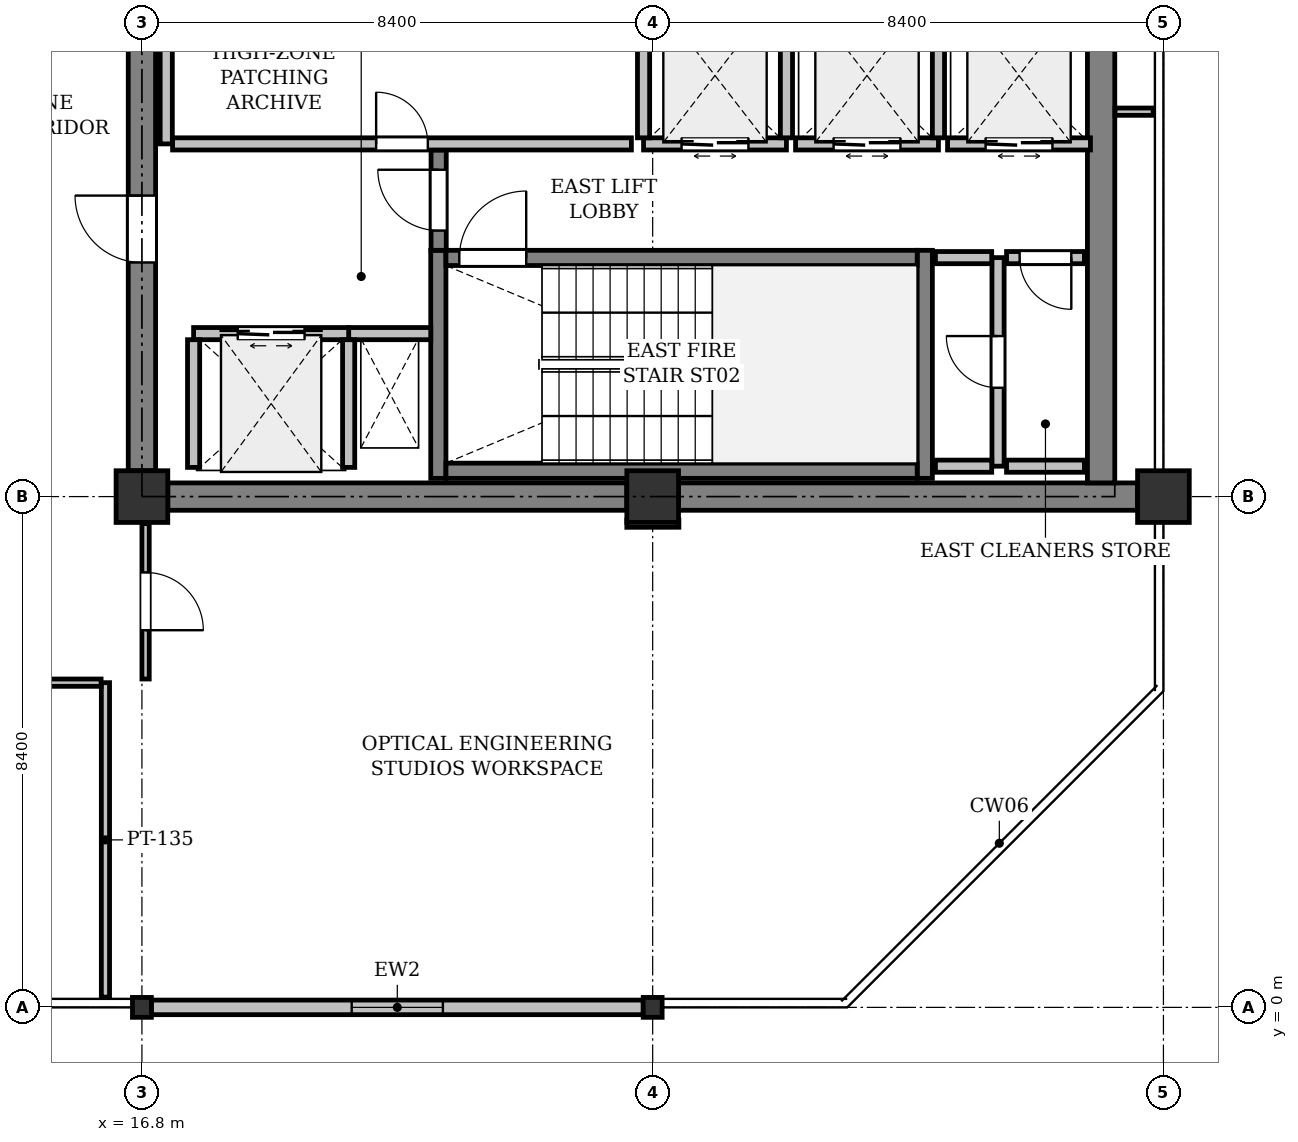
"""IFC4 building model, lengths in metres.
Left out: names, types, materials, properties, quantities, classifications, styles, units other than length and angle.
Written with IfcOpenShell. Run it as: python <this file> out.ifc"""

import sys

from ifc_helpers import new_model, si_unit, direction, frame, frame_2d, origin, origin_2d, place, context, subcontext, project, spatial, rectangle, i_section, extrude, element, fill, save


model = new_model("IFC4")
c1 = context("Model", 3, precision=1e-05, world=origin(), true_north=direction((0.0, 1.0)))
c2 = subcontext(c1, "Body", "Model", "MODEL_VIEW")
j1 = project(units=[si_unit("LENGTHUNIT", "METRE"), si_unit("PLANEANGLEUNIT", "RADIAN")], contexts=[c1])
p1 = place(None, origin())
s1 = spatial("IfcSite", under=j1, at=p1, CompositionType="ELEMENT")
p2 = place(p1, origin())
s2 = spatial("IfcBuilding", under=s1, at=p2, CompositionType="ELEMENT")
p3 = place(p2, frame((0.0, 0.0, 302.2)))
s3 = spatial("IfcBuildingStorey", under=s2, at=p3, CompositionType="ELEMENT", Elevation=302.2)
p4 = place(p3, frame((16.8, 0.0, 0.0), z_axis=(0.0, 0.0, 1.0), x_axis=(1.0, 0.0, 0.0)))
e1 = element("IfcColumn", 1, at=p4, inside=s3, PredefinedType="COLUMN", context=c2, shape_type="SweptSolid", body=[
    extrude(i_section(OverallWidth=0.311, OverallDepth=0.327, WebThickness=0.016, FlangeThickness=0.025, FilletRadius=0.017, at=origin_2d()), origin(), (0.0, 0.0, 1.0), 4.0),
])
p5 = place(p3, frame((16.8, 8.4, 0.0), z_axis=(0.0, 0.0, 1.0), x_axis=(1.0, 0.0, 0.0)))
e2 = element("IfcColumn", 2, at=p5, inside=s3, PredefinedType="COLUMN", context=c2, shape_type="SweptSolid", body=[
    extrude(rectangle(XDim=0.85, YDim=0.85, at=origin_2d()), origin(), (0.0, 0.0, 1.0), 4.0),
])
p6 = place(p3, frame((25.2, 0.0, 0.0), z_axis=(0.0, 0.0, 1.0), x_axis=(1.0, 0.0, 0.0)))
e3 = element("IfcColumn", 3, at=p6, inside=s3, PredefinedType="COLUMN", context=c2, shape_type="SweptSolid", body=[
    extrude(i_section(OverallWidth=0.311, OverallDepth=0.327, WebThickness=0.016, FlangeThickness=0.025, FilletRadius=0.017, at=origin_2d()), origin(), (0.0, 0.0, 1.0), 4.0),
])
for number, where, z_axis, x_axis in (
    (4, (25.2, 8.4, 0.0), (0.0, 0.0, 1.0), (1.0, 0.0, 0.0)),
    (5, (33.6, 8.4, 0.0), (0.0, 0.0, 1.0), (1.0, 0.0, 0.0)),
):
    element("IfcColumn", number, at=place(p3, frame(where, z_axis=z_axis, x_axis=x_axis)), inside=s3, PredefinedType="COLUMN", context=c2, shape_type="SweptSolid", body=[
        extrude(rectangle(XDim=0.85, YDim=0.85, at=origin_2d()), origin(), (0.0, 0.0, 1.0), 4.0),
    ])
p7 = place(p3, frame((25.044, 0.0, 0.0), z_axis=(0.0, 0.0, 1.0), x_axis=(-1.0, 0.0, 0.0)))
e6 = element("IfcWall", 6, at=p7, inside=s3, PredefinedType="STANDARD", context=c2, shape_type="SweptSolid", body=[
    extrude(rectangle(XDim=8.089, YDim=0.24, at=frame_2d((4.044, 0.0))), origin(), (0.0, 0.0, 1.0), 3.475),
])
p8 = place(p7, frame((3.294, 0.0, 0.9)))
e7 = element("IfcOpeningElement", 7, at=p8, cuts=e6, PredefinedType="OPENING", context=c2, shape_type="SweptSolid", body=[
    extrude(rectangle(XDim=1.5, YDim=1.6, at=frame_2d((0.75, 0.8))), frame((0.0, 0.13, 0.0), z_axis=(0.0, -1.0, 0.0), x_axis=(1.0, 0.0, 0.0)), (0.0, 0.0, 1.0), 0.26),
])
p9 = place(p3, frame((17.225, 8.4, 0.0), z_axis=(0.0, 0.0, 1.0), x_axis=(1.0, 0.0, 0.0)))
e8 = element("IfcWall", 8, at=p9, inside=s3, PredefinedType="SHEAR", context=c2, shape_type="SweptSolid", body=[
    extrude(rectangle(XDim=7.55, YDim=0.45, at=frame_2d((3.775, 0.0))), origin(), (0.0, 0.0, 1.0), 3.725),
])
p10 = place(p3, frame((25.625, 8.4, 0.0), z_axis=(0.0, 0.0, 1.0), x_axis=(1.0, 0.0, 0.0)))
e9 = element("IfcWall", 9, at=p10, inside=s3, PredefinedType="SHEAR", context=c2, shape_type="SweptSolid", body=[
    extrude(rectangle(XDim=7.55, YDim=0.45, at=frame_2d((3.775, 0.0))), origin(), (0.0, 0.0, 1.0), 3.725),
])
p11 = place(p3, frame((32.575, 8.625, 0.0), z_axis=(0.0, 0.0, 1.0), x_axis=(0.0, 1.0, 0.0)))
e10 = element("IfcWall", 10, at=p11, inside=s3, PredefinedType="SHEAR", context=c2, shape_type="SweptSolid", body=[
    extrude(rectangle(XDim=7.95, YDim=0.45, at=frame_2d((3.975, 0.0))), origin(), (0.0, 0.0, 1.0), 3.725),
])
p12 = place(p3, frame((16.8, 8.825, 0.0), z_axis=(0.0, 0.0, 1.0), x_axis=(0.0, 1.0, 0.0)))
e11 = element("IfcWall", 11, at=p12, inside=s3, PredefinedType="SHEAR", context=c2, shape_type="SweptSolid", body=[
    extrude(rectangle(XDim=7.55, YDim=0.45, at=frame_2d((3.775, 0.0))), origin(), (0.0, 0.0, 1.0), 3.725),
])
p13 = place(p12, frame((3.425, 0.0, 0.0)))
e12 = element("IfcOpeningElement", 12, at=p13, cuts=e11, PredefinedType="OPENING", context=c2, shape_type="SweptSolid", body=[
    extrude(rectangle(XDim=1.1, YDim=2.15, at=frame_2d((0.55, 1.075))), frame((0.0, 0.235, 0.0), z_axis=(0.0, -1.0, 0.0), x_axis=(1.0, 0.0, 0.0)), (0.0, 0.0, 1.0), 0.47),
])
for number, where, z_axis, x_axis in (
    (13, (21.675, 8.7, 0.0), (0.0, 0.0, 1.0), (0.0, 1.0, 0.0)),
    (14, (29.675, 8.7, 0.0), (0.0, 0.0, 1.0), (0.0, 1.0, 0.0)),
):
    element("IfcWall", number, at=place(p3, frame(where, z_axis=z_axis, x_axis=x_axis)), inside=s3, PredefinedType="SHEAR", context=c2, shape_type="SweptSolid", body=[
        extrude(rectangle(XDim=3.75, YDim=0.25, at=frame_2d((1.875, 0.0))), origin(), (0.0, 0.0, 1.0), 3.725),
    ])
p14 = place(p3, frame((21.8, 8.825, 0.0), z_axis=(0.0, 0.0, 1.0), x_axis=(1.0, 0.0, 0.0)))
e15 = element("IfcWall", 15, at=p14, inside=s3, PredefinedType="SHEAR", context=c2, shape_type="SweptSolid", body=[
    extrude(rectangle(XDim=7.75, YDim=0.25, at=frame_2d((3.875, 0.0))), origin(), (0.0, 0.0, 1.0), 3.725),
])
p15 = place(p3, frame((21.8, 12.325, 0.0), z_axis=(0.0, 0.0, 1.0), x_axis=(1.0, 0.0, 0.0)))
e16 = element("IfcWall", 16, at=p15, inside=s3, PredefinedType="SHEAR", context=c2, shape_type="SweptSolid", body=[
    extrude(rectangle(XDim=7.75, YDim=0.25, at=frame_2d((3.875, 0.0))), origin(), (0.0, 0.0, 1.0), 3.725),
])
p16 = place(p15, frame((0.22, 0.0, 0.0)))
e17 = element("IfcOpeningElement", 17, at=p16, cuts=e16, PredefinedType="OPENING", context=c2, shape_type="SweptSolid", body=[
    extrude(rectangle(XDim=1.1, YDim=2.15, at=frame_2d((0.55, 1.075))), frame((0.0, 0.135, 0.0), z_axis=(0.0, -1.0, 0.0), x_axis=(1.0, 0.0, 0.0)), (0.0, 0.0, 1.0), 0.27),
])
p17 = place(p3, frame((20.2, 11.08, 0.0), z_axis=(0.0, 0.0, 1.0), x_axis=(1.0, 0.0, 0.0)))
e18 = element("IfcWall", 18, at=p17, inside=s3, PredefinedType="PARTITIONING", context=c2, shape_type="SweptSolid", body=[
    extrude(rectangle(XDim=1.35, YDim=0.2, at=frame_2d((0.675, 0.0))), origin(), (0.0, 0.0, 1.0), 3.725),
])
p18 = place(p3, frame((21.68, 12.45, 0.0), z_axis=(0.0, 0.0, 1.0), x_axis=(0.0, 1.0, 0.0)))
e19 = element("IfcWall", 19, at=p18, inside=s3, PredefinedType="SHEAR", context=c2, shape_type="SweptSolid", body=[
    extrude(rectangle(XDim=1.65, YDim=0.25, at=frame_2d((0.825, 0.0))), origin(), (0.0, 0.0, 1.0), 3.725),
])
p19 = place(p18, frame((0.325, 0.0, 0.0)))
e20 = element("IfcOpeningElement", 20, at=p19, cuts=e19, PredefinedType="OPENING", context=c2, shape_type="SweptSolid", body=[
    extrude(rectangle(XDim=1.0, YDim=2.15, at=frame_2d((0.5, 1.075))), frame((0.0, 0.135, 0.0), z_axis=(0.0, -1.0, 0.0), x_axis=(1.0, 0.0, 0.0)), (0.0, 0.0, 1.0), 0.27),
])
p20 = place(p3, frame((17.65, 11.08, 0.0), z_axis=(0.0, 0.0, 1.0), x_axis=(1.0, 0.0, 0.0)))
e21 = element("IfcWall", 21, at=p20, inside=s3, PredefinedType="PARTITIONING", context=c2, shape_type="SweptSolid", body=[
    extrude(rectangle(XDim=2.55, YDim=0.2, at=frame_2d((1.275, 0.0))), origin(), (0.0, 0.0, 1.0), 3.725),
])
p21 = place(p20, frame((0.725, 0.0, 0.0)))
e22 = element("IfcOpeningElement", 22, at=p21, cuts=e21, PredefinedType="OPENING", context=c2, shape_type="SweptSolid", body=[
    extrude(rectangle(XDim=1.1, YDim=2.2, at=frame_2d((0.55, 1.1))), frame((0.0, 0.11, 0.0), z_axis=(0.0, -1.0, 0.0), x_axis=(1.0, 0.0, 0.0)), (0.0, 0.0, 1.0), 0.22),
])
for number, where, z_axis, x_axis in (
    (23, (20.2, 8.88, 0.0), (0.0, 0.0, 1.0), (0.0, 1.0, 0.0)),
    (24, (17.65, 8.88, 0.0), (0.0, 0.0, 1.0), (0.0, 1.0, 0.0)),
):
    element("IfcWall", number, at=place(p3, frame(where, z_axis=z_axis, x_axis=x_axis)), inside=s3, PredefinedType="PARTITIONING", context=c2, shape_type="SweptSolid", body=[
        extrude(rectangle(XDim=2.1, YDim=0.2, at=frame_2d((1.05, 0.0))), origin(), (0.0, 0.0, 1.0), 3.725),
    ])
p22 = place(p3, frame((25.05, 14.2, 0.0), z_axis=(0.0, 0.0, 1.0), x_axis=(1.0, 0.0, 0.0)))
e25 = element("IfcWall", 25, at=p22, inside=s3, PredefinedType="PARTITIONING", context=c2, shape_type="SweptSolid", body=[
    extrude(rectangle(XDim=2.35, YDim=0.2, at=frame_2d((1.175, 0.0))), origin(), (0.0, 0.0, 1.0), 3.725),
])
p23 = place(p22, frame((0.625, 0.0, 0.0)))
e26 = element("IfcOpeningElement", 26, at=p23, cuts=e25, PredefinedType="OPENING", context=c2, shape_type="SweptSolid", body=[
    extrude(rectangle(XDim=1.1, YDim=2.2, at=frame_2d((0.55, 1.1))), frame((0.0, 0.11, 0.0), z_axis=(0.0, -1.0, 0.0), x_axis=(1.0, 0.0, 0.0)), (0.0, 0.0, 1.0), 0.22),
])
for number, where, z_axis, x_axis in (
    (27, (27.4, 14.3, 0.0), (0.0, 0.0, 1.0), (0.0, 1.0, 0.0)),
    (28, (25.05, 14.3, 0.0), (0.0, 0.0, 1.0), (0.0, 1.0, 0.0)),
):
    element("IfcWall", number, at=place(p3, frame(where, z_axis=z_axis, x_axis=x_axis)), inside=s3, PredefinedType="PARTITIONING", context=c2, shape_type="SweptSolid", body=[
        extrude(rectangle(XDim=2.05, YDim=0.2, at=frame_2d((1.025, 0.0))), origin(), (0.0, 0.0, 1.0), 3.725),
    ])
p24 = place(p3, frame((27.55, 14.2, 0.0), z_axis=(0.0, 0.0, 1.0), x_axis=(1.0, 0.0, 0.0)))
e29 = element("IfcWall", 29, at=p24, inside=s3, PredefinedType="PARTITIONING", context=c2, shape_type="SweptSolid", body=[
    extrude(rectangle(XDim=2.35, YDim=0.2, at=frame_2d((1.175, 0.0))), origin(), (0.0, 0.0, 1.0), 3.725),
])
p25 = place(p24, frame((0.625, 0.0, 0.0)))
e30 = element("IfcOpeningElement", 30, at=p25, cuts=e29, PredefinedType="OPENING", context=c2, shape_type="SweptSolid", body=[
    extrude(rectangle(XDim=1.1, YDim=2.2, at=frame_2d((0.55, 1.1))), frame((0.0, 0.11, 0.0), z_axis=(0.0, -1.0, 0.0), x_axis=(1.0, 0.0, 0.0)), (0.0, 0.0, 1.0), 0.22),
])
p26 = place(p3, frame((29.9, 14.3, 0.0), z_axis=(0.0, 0.0, 1.0), x_axis=(0.0, 1.0, 0.0)))
e31 = element("IfcWall", 31, at=p26, inside=s3, PredefinedType="PARTITIONING", context=c2, shape_type="SweptSolid", body=[
    extrude(rectangle(XDim=2.05, YDim=0.2, at=frame_2d((1.025, 0.0))), origin(), (0.0, 0.0, 1.0), 3.725),
])
p27 = place(p3, frame((30.05, 14.2, 0.0), z_axis=(0.0, 0.0, 1.0), x_axis=(1.0, 0.0, 0.0)))
e32 = element("IfcWall", 32, at=p27, inside=s3, PredefinedType="PARTITIONING", context=c2, shape_type="SweptSolid", body=[
    extrude(rectangle(XDim=2.35, YDim=0.2, at=frame_2d((1.175, 0.0))), origin(), (0.0, 0.0, 1.0), 3.725),
])
p28 = place(p27, frame((0.625, 0.0, 0.0)))
e33 = element("IfcOpeningElement", 33, at=p28, cuts=e32, PredefinedType="OPENING", context=c2, shape_type="SweptSolid", body=[
    extrude(rectangle(XDim=1.1, YDim=2.2, at=frame_2d((0.55, 1.1))), frame((0.0, 0.11, 0.0), z_axis=(0.0, -1.0, 0.0), x_axis=(1.0, 0.0, 0.0)), (0.0, 0.0, 1.0), 0.22),
])
p29 = place(p3, frame((17.2, 16.37, 0.0), z_axis=(0.0, 0.0, 1.0), x_axis=(0.0, -1.0, 0.0)))
e34 = element("IfcWall", 34, at=p29, inside=s3, PredefinedType="PARTITIONING", context=c2, shape_type="SweptSolid", body=[
    extrude(rectangle(XDim=2.17, YDim=0.2, at=frame_2d((1.085, 0.0))), origin(), (0.0, 0.0, 1.0), 3.725),
])
p30 = place(p3, frame((17.304, 14.2, 0.0), z_axis=(0.0, 0.0, 1.0), x_axis=(1.0, 0.0, 0.0)))
e35 = element("IfcWall", 35, at=p30, inside=s3, PredefinedType="PARTITIONING", context=c2, shape_type="SweptSolid", body=[
    extrude(rectangle(XDim=7.546, YDim=0.2, at=frame_2d((3.773, 0.0))), origin(), (0.0, 0.0, 1.0), 3.725),
])
p31 = place(p30, frame((3.348, 0.0, 0.0)))
e36 = element("IfcOpeningElement", 36, at=p31, cuts=e35, PredefinedType="OPENING", context=c2, shape_type="SweptSolid", body=[
    extrude(rectangle(XDim=0.85, YDim=2.15, at=frame_2d((0.425, 1.075))), frame((0.0, 0.11, 0.0), z_axis=(0.0, -1.0, 0.0), x_axis=(1.0, 0.0, 0.0)), (0.0, 0.0, 1.0), 0.22),
])
p32 = place(p3, frame((30.88, 8.9, 0.0), z_axis=(0.0, 0.0, 1.0), x_axis=(0.0, 1.0, 0.0)))
e37 = element("IfcWall", 37, at=p32, inside=s3, PredefinedType="PARTITIONING", context=c2, shape_type="SweptSolid", body=[
    extrude(rectangle(XDim=3.43, YDim=0.2, at=frame_2d((1.715, 0.0))), origin(), (0.0, 0.0, 1.0), 3.725),
])
p33 = place(p32, frame((1.29, 0.0, 0.0)))
e38 = element("IfcOpeningElement", 38, at=p33, cuts=e37, PredefinedType="OPENING", context=c2, shape_type="SweptSolid", body=[
    extrude(rectangle(XDim=0.85, YDim=2.15, at=frame_2d((0.425, 1.075))), frame((0.0, 0.11, 0.0), z_axis=(0.0, -1.0, 0.0), x_axis=(1.0, 0.0, 0.0)), (0.0, 0.0, 1.0), 0.22),
])
for number, where, z_axis, x_axis in (
    (39, (30.776, 12.33, 0.0), (0.0, 0.0, 1.0), (-1.0, 0.0, 0.0)),
    (40, (29.85, 8.9, 0.0), (0.0, 0.0, 1.0), (1.0, 0.0, 0.0)),
):
    element("IfcWall", number, at=place(p3, frame(where, z_axis=z_axis, x_axis=x_axis)), inside=s3, PredefinedType="PARTITIONING", context=c2, shape_type="SweptSolid", body=[
        extrude(rectangle(XDim=0.926, YDim=0.2, at=frame_2d((0.463, 0.0))), origin(), (0.0, 0.0, 1.0), 3.725),
    ])
p34 = place(p3, frame((32.3, 12.33, 0.0), z_axis=(0.0, 0.0, 1.0), x_axis=(-1.0, 0.0, 0.0)))
e41 = element("IfcWall", 41, at=p34, inside=s3, PredefinedType="PARTITIONING", context=c2, shape_type="SweptSolid", body=[
    extrude(rectangle(XDim=1.28, YDim=0.2, at=frame_2d((0.64, 0.0))), origin(), (0.0, 0.0, 1.0), 3.725),
])
p35 = place(p34, frame((0.215, 0.0, 0.0)))
e42 = element("IfcOpeningElement", 42, at=p35, cuts=e41, PredefinedType="OPENING", context=c2, shape_type="SweptSolid", body=[
    extrude(rectangle(XDim=0.85, YDim=2.15, at=frame_2d((0.425, 1.075))), frame((0.0, 0.11, 0.0), z_axis=(0.0, -1.0, 0.0), x_axis=(1.0, 0.0, 0.0)), (0.0, 0.0, 1.0), 0.22),
])
p36 = place(p3, frame((31.02, 8.9, 0.0), z_axis=(0.0, 0.0, 1.0), x_axis=(1.0, 0.0, 0.0)))
e43 = element("IfcWall", 43, at=p36, inside=s3, PredefinedType="PARTITIONING", context=c2, shape_type="SweptSolid", body=[
    extrude(rectangle(XDim=1.28, YDim=0.2, at=frame_2d((0.64, 0.0))), origin(), (0.0, 0.0, 1.0), 3.725),
])
p37 = place(p3, frame((16.2, 0.169, 0.0), z_axis=(0.0, 0.0, 1.0), x_axis=(0.0, 1.0, 0.0)))
e44 = element("IfcWall", 44, at=p37, inside=s3, PredefinedType="PARTITIONING", context=c2, shape_type="SweptSolid", body=[
    extrude(rectangle(XDim=5.171, YDim=0.135, at=frame_2d((2.585, 0.0))), origin(), (0.0, 0.0, 1.0), 3.725),
])
p38 = place(p3, frame((16.128, 5.34, 0.0), z_axis=(0.0, 0.0, 1.0), x_axis=(-1.0, 0.0, 0.0)))
e45 = element("IfcWall", 45, at=p38, inside=s3, PredefinedType="PARTITIONING", context=c2, shape_type="SweptSolid", body=[
    extrude(rectangle(XDim=2.857, YDim=0.12, at=frame_2d((1.428, 0.0))), origin(), (0.0, 0.0, 1.0), 3.725),
])
p39 = place(p38, frame((0.969, 0.0, 0.0)))
e46 = element("IfcOpeningElement", 46, at=p39, cuts=e45, PredefinedType="OPENING", context=c2, shape_type="SweptSolid", body=[
    extrude(rectangle(XDim=0.92, YDim=2.1, at=frame_2d((0.46, 1.05))), frame((0.0, 0.07, 0.0), z_axis=(0.0, -1.0, 0.0), x_axis=(1.0, 0.0, 0.0)), (0.0, 0.0, 1.0), 0.14),
])
p40 = place(p3, frame((32.804, 14.73, 0.0), z_axis=(0.0, 0.0, 1.0), x_axis=(1.0, 0.0, 0.0)))
e47 = element("IfcWall", 47, at=p40, inside=s3, PredefinedType="PARTITIONING", context=c2, shape_type="SweptSolid", body=[
    extrude(rectangle(XDim=0.627, YDim=0.12, at=frame_2d((0.313, 0.0))), origin(), (0.0, 0.0, 1.0), 3.725),
])
p41 = place(p3, frame((25.631, 7.956, 0.0), z_axis=(0.0, 0.0, 1.0), x_axis=(-0.99999963391, -0.000855675671, 0.0)))
e48 = element("IfcWall", 48, at=p41, inside=s3, PredefinedType="PARTITIONING", context=c2, shape_type="SweptSolid", body=[
    extrude(rectangle(XDim=0.856, YDim=0.12, at=frame_2d((0.428, 0.0))), origin(), (0.0, 0.0, 1.0), 3.319),
])
p42 = place(p3, frame((16.86, 7.955, 0.0), z_axis=(0.0, 0.0, 1.0), x_axis=(0.0, -1.0, 0.0)))
e49 = element("IfcWall", 49, at=p42, inside=s3, PredefinedType="PARTITIONING", context=c2, shape_type="SweptSolid", body=[
    extrude(rectangle(XDim=2.555, YDim=0.12, at=frame_2d((1.278, 0.0))), origin(), (0.0, 0.0, 1.0), 3.319),
])
p43 = place(p42, frame((0.802, 0.0, 0.0)))
e50 = element("IfcOpeningElement", 50, at=p43, cuts=e49, PredefinedType="OPENING", context=c2, shape_type="SweptSolid", body=[
    extrude(rectangle(XDim=0.95, YDim=2.15, at=frame_2d((0.475, 1.075))), frame((0.0, 0.07, 0.0), z_axis=(0.0, -1.0, 0.0), x_axis=(1.0, 0.0, 0.0)), (0.0, 0.0, 1.0), 0.14),
])
p44 = place(p8, origin())
e51 = element("IfcWindow", 51, at=p44, inside=s3, PartitioningType="SINGLE_PANEL", PredefinedType="WINDOW", context=c2, shape_type="SweptSolid", body=[
    extrude(rectangle(XDim=1.5, YDim=1.6, at=frame_2d((0.75, 0.8))), frame((0.0, 0.03, 0.0), z_axis=(0.0, -1.0, 0.0), x_axis=(1.0, 0.0, 0.0)), (0.0, 0.0, 1.0), 0.06),
])
fill(e7, e51)
p45 = place(p13, origin())
e52 = element("IfcDoor", 52, at=p45, inside=s3, OperationType="SINGLE_SWING_RIGHT", PredefinedType="DOOR", context=c2, shape_type="SweptSolid", body=[
    extrude(rectangle(XDim=1.1, YDim=2.15, at=frame_2d((0.55, 1.075))), frame((0.0, 0.025, 0.0), z_axis=(0.0, -1.0, 0.0), x_axis=(1.0, 0.0, 0.0)), (0.0, 0.0, 1.0), 0.05),
])
fill(e12, e52)
p46 = place(p16, origin())
e53 = element("IfcDoor", 53, at=p46, inside=s3, OperationType="SINGLE_SWING_RIGHT", PredefinedType="DOOR", context=c2, shape_type="SweptSolid", body=[
    extrude(rectangle(XDim=1.1, YDim=2.15, at=frame_2d((0.55, 1.075))), frame((0.0, 0.025, 0.0), z_axis=(0.0, -1.0, 0.0), x_axis=(1.0, 0.0, 0.0)), (0.0, 0.0, 1.0), 0.05),
])
fill(e17, e53)
p47 = place(p19, origin())
e54 = element("IfcDoor", 54, at=p47, inside=s3, OperationType="SINGLE_SWING_RIGHT", PredefinedType="DOOR", context=c2, shape_type="SweptSolid", body=[
    extrude(rectangle(XDim=1.0, YDim=2.15, at=frame_2d((0.5, 1.075))), frame((0.0, 0.025, 0.0), z_axis=(0.0, -1.0, 0.0), x_axis=(1.0, 0.0, 0.0)), (0.0, 0.0, 1.0), 0.05),
])
fill(e20, e54)
p48 = place(p21, origin())
e55 = element("IfcDoor", 55, at=p48, inside=s3, OperationType="DOUBLE_DOOR_SLIDING", PredefinedType="DOOR", context=c2, shape_type="SweptSolid", body=[
    extrude(rectangle(XDim=1.1, YDim=2.2, at=frame_2d((0.55, 1.1))), frame((0.0, 0.025, 0.0), z_axis=(0.0, -1.0, 0.0), x_axis=(1.0, 0.0, 0.0)), (0.0, 0.0, 1.0), 0.05),
])
fill(e22, e55)
p49 = place(p23, origin())
e56 = element("IfcDoor", 56, at=p49, inside=s3, OperationType="DOUBLE_DOOR_SLIDING", PredefinedType="DOOR", context=c2, shape_type="SweptSolid", body=[
    extrude(rectangle(XDim=1.1, YDim=2.2, at=frame_2d((0.55, 1.1))), frame((0.0, 0.025, 0.0), z_axis=(0.0, -1.0, 0.0), x_axis=(1.0, 0.0, 0.0)), (0.0, 0.0, 1.0), 0.05),
])
fill(e26, e56)
p50 = place(p25, origin())
e57 = element("IfcDoor", 57, at=p50, inside=s3, OperationType="DOUBLE_DOOR_SLIDING", PredefinedType="DOOR", context=c2, shape_type="SweptSolid", body=[
    extrude(rectangle(XDim=1.1, YDim=2.2, at=frame_2d((0.55, 1.1))), frame((0.0, 0.025, 0.0), z_axis=(0.0, -1.0, 0.0), x_axis=(1.0, 0.0, 0.0)), (0.0, 0.0, 1.0), 0.05),
])
fill(e30, e57)
p51 = place(p28, origin())
e58 = element("IfcDoor", 58, at=p51, inside=s3, OperationType="DOUBLE_DOOR_SLIDING", PredefinedType="DOOR", context=c2, shape_type="SweptSolid", body=[
    extrude(rectangle(XDim=1.1, YDim=2.2, at=frame_2d((0.55, 1.1))), frame((0.0, 0.025, 0.0), z_axis=(0.0, -1.0, 0.0), x_axis=(1.0, 0.0, 0.0)), (0.0, 0.0, 1.0), 0.05),
])
fill(e33, e58)
p52 = place(p31, origin())
e59 = element("IfcDoor", 59, at=p52, inside=s3, OperationType="SINGLE_SWING_LEFT", PredefinedType="DOOR", context=c2, shape_type="SweptSolid", body=[
    extrude(rectangle(XDim=0.85, YDim=2.15, at=frame_2d((0.425, 1.075))), frame((0.0, 0.025, 0.0), z_axis=(0.0, -1.0, 0.0), x_axis=(1.0, 0.0, 0.0)), (0.0, 0.0, 1.0), 0.05),
])
fill(e36, e59)
p53 = place(p33, origin())
e60 = element("IfcDoor", 60, at=p53, inside=s3, OperationType="SINGLE_SWING_RIGHT", PredefinedType="DOOR", context=c2, shape_type="SweptSolid", body=[
    extrude(rectangle(XDim=0.85, YDim=2.15, at=frame_2d((0.425, 1.075))), frame((0.0, 0.025, 0.0), z_axis=(0.0, -1.0, 0.0), x_axis=(1.0, 0.0, 0.0)), (0.0, 0.0, 1.0), 0.05),
])
fill(e38, e60)
p54 = place(p35, origin())
e61 = element("IfcDoor", 61, at=p54, inside=s3, OperationType="SINGLE_SWING_LEFT", PredefinedType="DOOR", context=c2, shape_type="SweptSolid", body=[
    extrude(rectangle(XDim=0.85, YDim=2.15, at=frame_2d((0.425, 1.075))), frame((0.0, 0.025, 0.0), z_axis=(0.0, -1.0, 0.0), x_axis=(1.0, 0.0, 0.0)), (0.0, 0.0, 1.0), 0.05),
])
fill(e42, e61)
p55 = place(p43, origin())
e62 = element("IfcDoor", 62, at=p55, inside=s3, OperationType="SINGLE_SWING_RIGHT", PredefinedType="DOOR", context=c2, shape_type="SweptSolid", body=[
    extrude(rectangle(XDim=0.95, YDim=2.15, at=frame_2d((0.475, 1.075))), frame((0.0, 0.025, 0.0), z_axis=(0.0, -1.0, 0.0), x_axis=(1.0, 0.0, 0.0)), (0.0, 0.0, 1.0), 0.05),
])
fill(e50, e62)
save(model, sys.argv[1])
